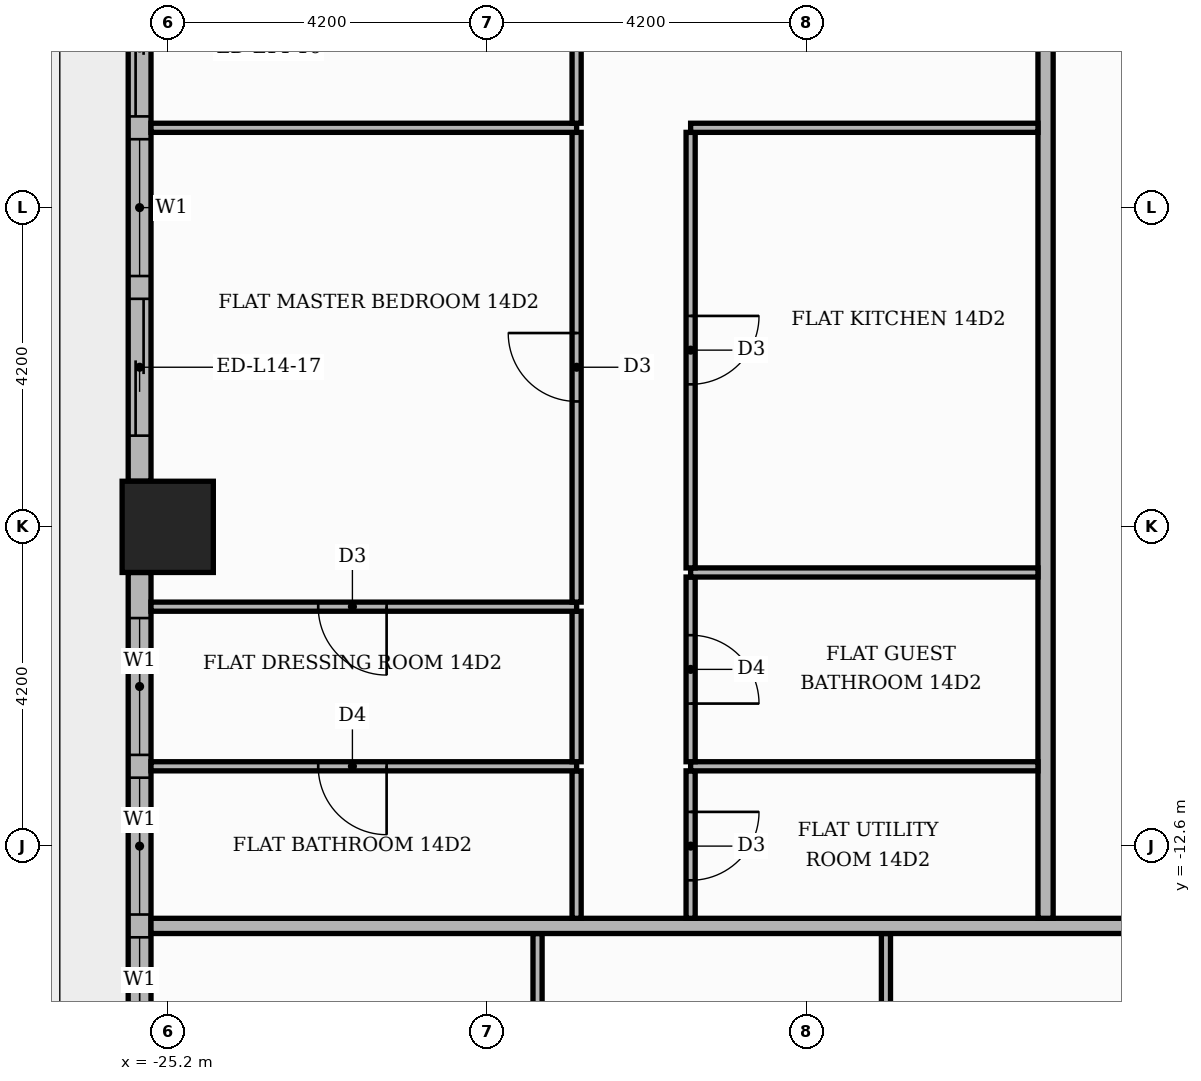
"""IFC4 building model, lengths in metres.
Left out: names, types, materials, properties, quantities, classifications, styles, units other than length and angle.
Written with IfcOpenShell. Run it as: python <this file> out.ifc"""

import sys

from ifc_helpers import new_model, si_unit, direction, frame, frame_2d, origin, origin_2d, place, context, subcontext, project, spatial, rectangle, extrude, element, fill, save


model = new_model("IFC4")
c1 = context("Model", 3, precision=1e-05, world=origin(), true_north=direction((0.0, 1.0)))
c2 = subcontext(c1, "Body", "Model", "MODEL_VIEW")
j1 = project(units=[si_unit("LENGTHUNIT", "METRE"), si_unit("PLANEANGLEUNIT", "RADIAN")], contexts=[c1])
p1 = place(None, origin())
s1 = spatial("IfcSite", under=j1, at=p1, CompositionType="ELEMENT")
p2 = place(p1, origin())
s2 = spatial("IfcBuilding", under=s1, at=p2, CompositionType="ELEMENT")
p3 = place(p2, frame((0.0, 0.0, 62.1)))
s3 = spatial("IfcBuildingStorey", under=s2, at=p3, CompositionType="ELEMENT", Elevation=62.1)
p4 = place(p3, frame((-25.2, -8.4, 0.0), z_axis=(0.0, 0.0, 1.0), x_axis=(1.0, 0.0, 0.0)))
e1 = element("IfcColumn", 1, at=p4, inside=s3, PredefinedType="COLUMN", context=c2, shape_type="SweptSolid", body=[
    extrude(rectangle(XDim=1.2, YDim=1.2, at=origin_2d()), origin(), (0.0, 0.0, 1.0), 3.9),
])
p5 = place(p3, frame((-25.57, -0.6, 0.0), z_axis=(0.0, 0.0, 1.0), x_axis=(0.0, -1.0, 0.0)))
e2 = element("IfcWall", 2, at=p5, inside=s3, PredefinedType="STANDARD", context=c2, shape_type="SweptSolid", body=[
    extrude(rectangle(XDim=7.2, YDim=0.3, at=frame_2d((3.6, 0.0))), origin(), (0.0, 0.0, 1.0), 3.48),
])
p6 = place(p5, frame((0.6, 0.0, 0.0)))
e3 = element("IfcOpeningElement", 3, at=p6, cuts=e2, PredefinedType="OPENING", context=c2, shape_type="SweptSolid", body=[
    extrude(rectangle(XDim=1.8, YDim=2.4, at=frame_2d((0.9, 1.2))), frame((0.0, 0.16, 0.0), z_axis=(0.0, -1.0, 0.0), x_axis=(1.0, 0.0, 0.0)), (0.0, 0.0, 1.0), 0.32),
])
p7 = place(p5, frame((2.7, 0.0, 0.9)))
e4 = element("IfcOpeningElement", 4, at=p7, cuts=e2, PredefinedType="OPENING", context=c2, shape_type="SweptSolid", body=[
    extrude(rectangle(XDim=1.8, YDim=2.1, at=frame_2d((0.9, 1.05))), frame((0.0, 0.16, 0.0), z_axis=(0.0, -1.0, 0.0), x_axis=(1.0, 0.0, 0.0)), (0.0, 0.0, 1.0), 0.32),
])
p8 = place(p5, frame((4.8, 0.0, 0.0)))
e5 = element("IfcOpeningElement", 5, at=p8, cuts=e2, PredefinedType="OPENING", context=c2, shape_type="SweptSolid", body=[
    extrude(rectangle(XDim=1.8, YDim=2.4, at=frame_2d((0.9, 1.2))), frame((0.0, 0.16, 0.0), z_axis=(0.0, -1.0, 0.0), x_axis=(1.0, 0.0, 0.0)), (0.0, 0.0, 1.0), 0.32),
])
p9 = place(p3, frame((-25.57, -9.0, 0.0), z_axis=(0.0, 0.0, 1.0), x_axis=(0.0, -1.0, 0.0)))
e6 = element("IfcWall", 6, at=p9, inside=s3, PredefinedType="STANDARD", context=c2, shape_type="SweptSolid", body=[
    extrude(rectangle(XDim=7.2, YDim=0.3, at=frame_2d((3.6, 0.0))), origin(), (0.0, 0.0, 1.0), 3.48),
])
p10 = place(p9, frame((0.6, 0.0, 0.9)))
e7 = element("IfcOpeningElement", 7, at=p10, cuts=e6, PredefinedType="OPENING", context=c2, shape_type="SweptSolid", body=[
    extrude(rectangle(XDim=1.8, YDim=2.1, at=frame_2d((0.9, 1.05))), frame((0.0, 0.16, 0.0), z_axis=(0.0, -1.0, 0.0), x_axis=(1.0, 0.0, 0.0)), (0.0, 0.0, 1.0), 0.32),
])
p11 = place(p9, frame((2.7, 0.0, 0.9)))
e8 = element("IfcOpeningElement", 8, at=p11, cuts=e6, PredefinedType="OPENING", context=c2, shape_type="SweptSolid", body=[
    extrude(rectangle(XDim=1.8, YDim=2.1, at=frame_2d((0.9, 1.05))), frame((0.0, 0.16, 0.0), z_axis=(0.0, -1.0, 0.0), x_axis=(1.0, 0.0, 0.0)), (0.0, 0.0, 1.0), 0.32),
])
p12 = place(p9, frame((4.8, 0.0, 0.9)))
e9 = element("IfcOpeningElement", 9, at=p12, cuts=e6, PredefinedType="OPENING", context=c2, shape_type="SweptSolid", body=[
    extrude(rectangle(XDim=1.8, YDim=2.1, at=frame_2d((0.9, 1.05))), frame((0.0, 0.16, 0.0), z_axis=(0.0, -1.0, 0.0), x_axis=(1.0, 0.0, 0.0)), (0.0, 0.0, 1.0), 0.32),
])
p13 = place(p3, frame((-20.334, -20.66, 0.0), z_axis=(0.0, 0.0, 1.0), x_axis=(0.0, 1.0, 0.0)))
e10 = element("IfcWall", 10, at=p13, inside=s3, PredefinedType="PARTITIONING", context=c2, shape_type="SweptSolid", body=[
    extrude(rectangle(XDim=6.91, YDim=0.12, at=frame_2d((3.455, 0.0))), origin(), (0.0, 0.0, 1.0), 3.48),
])
p14 = place(p13, frame((4.792, 0.0, 0.0)))
e11 = element("IfcOpeningElement", 11, at=p14, cuts=e10, PredefinedType="OPENING", context=c2, shape_type="SweptSolid", body=[
    extrude(rectangle(XDim=0.9, YDim=2.1, at=frame_2d((0.45, 1.05))), frame((0.0, 0.07, 0.0), z_axis=(0.0, -1.0, 0.0), x_axis=(1.0, 0.0, 0.0)), (0.0, 0.0, 1.0), 0.14),
])
p15 = place(p3, frame((-15.75, -20.66, 0.0), z_axis=(0.0, 0.0, 1.0), x_axis=(0.0, 1.0, 0.0)))
e12 = element("IfcWall", 12, at=p15, inside=s3, PredefinedType="PARTITIONING", context=c2, shape_type="SweptSolid", body=[
    extrude(rectangle(XDim=6.91, YDim=0.12, at=frame_2d((3.455, 0.0))), origin(), (0.0, 0.0, 1.0), 3.48),
])
p16 = place(p15, frame((2.975, 0.0, 0.0)))
e13 = element("IfcOpeningElement", 13, at=p16, cuts=e12, PredefinedType="OPENING", context=c2, shape_type="SweptSolid", body=[
    extrude(rectangle(XDim=1.0, YDim=2.1, at=frame_2d((0.5, 1.05))), frame((0.0, 0.07, 0.0), z_axis=(0.0, -1.0, 0.0), x_axis=(1.0, 0.0, 0.0)), (0.0, 0.0, 1.0), 0.14),
])
p17 = place(p3, frame((-25.42, -13.65, 0.0), z_axis=(0.0, 0.0, 1.0), x_axis=(1.0, 0.0, 0.0)))
e14 = element("IfcWall", 14, at=p17, inside=s3, PredefinedType="PARTITIONING", context=c2, shape_type="SweptSolid", body=[
    extrude(rectangle(XDim=39.07, YDim=0.2, at=frame_2d((19.535, 0.0))), origin(), (0.0, 0.0, 1.0), 3.48),
])
p18 = place(p17, frame((13.32, 0.0, 0.0)))
e15 = element("IfcOpeningElement", 15, at=p18, cuts=e14, PredefinedType="OPENING", context=c2, shape_type="SweptSolid", body=[
    extrude(rectangle(XDim=1.1, YDim=2.4, at=frame_2d((0.55, 1.2))), frame((0.0, 0.11, 0.0), z_axis=(0.0, -1.0, 0.0), x_axis=(1.0, 0.0, 0.0)), (0.0, 0.0, 1.0), 0.22),
])
p19 = place(p17, frame((21.72, 0.0, 0.0)))
e16 = element("IfcOpeningElement", 16, at=p19, cuts=e14, PredefinedType="OPENING", context=c2, shape_type="SweptSolid", body=[
    extrude(rectangle(XDim=1.1, YDim=2.4, at=frame_2d((0.55, 1.2))), frame((0.0, 0.11, 0.0), z_axis=(0.0, -1.0, 0.0), x_axis=(1.0, 0.0, 0.0)), (0.0, 0.0, 1.0), 0.22),
])
p20 = place(p3, frame((-19.82, -13.55, 0.0), z_axis=(0.0, 0.0, 1.0), x_axis=(0.0, 1.0, 0.0)))
e17 = element("IfcWall", 17, at=p20, inside=s3, PredefinedType="PARTITIONING", context=c2, shape_type="SweptSolid", body=[
    extrude(rectangle(XDim=1.94, YDim=0.12, at=frame_2d((0.97, 0.0))), origin(), (0.0, 0.0, 1.0), 3.48),
])
p21 = place(p3, frame((-18.32, -13.55, 0.0), z_axis=(0.0, 0.0, 1.0), x_axis=(0.0, 1.0, 0.0)))
e18 = element("IfcWall", 18, at=p21, inside=s3, PredefinedType="PARTITIONING", context=c2, shape_type="SweptSolid", body=[
    extrude(rectangle(XDim=1.94, YDim=0.12, at=frame_2d((0.97, 0.0))), origin(), (0.0, 0.0, 1.0), 3.48),
])
p22 = place(p21, frame((0.5, 0.0, 0.0)))
e19 = element("IfcOpeningElement", 19, at=p22, cuts=e18, PredefinedType="OPENING", context=c2, shape_type="SweptSolid", body=[
    extrude(rectangle(XDim=0.9, YDim=2.1, at=frame_2d((0.45, 1.05))), frame((0.0, 0.07, 0.0), z_axis=(0.0, -1.0, 0.0), x_axis=(1.0, 0.0, 0.0)), (0.0, 0.0, 1.0), 0.14),
])
p23 = place(p3, frame((-13.65, -13.55, 0.0), z_axis=(0.0, 0.0, 1.0), x_axis=(0.0, 1.0, 0.0)))
e20 = element("IfcWall", 20, at=p23, inside=s3, PredefinedType="PARTITIONING", context=c2, shape_type="SweptSolid", body=[
    extrude(rectangle(XDim=18.7, YDim=0.2, at=frame_2d((9.35, 0.0))), origin(), (0.0, 0.0, 1.0), 3.48),
])
p24 = place(p23, frame((11.95, 0.0, 0.0)))
e21 = element("IfcOpeningElement", 21, at=p24, cuts=e20, PredefinedType="OPENING", context=c2, shape_type="SweptSolid", body=[
    extrude(rectangle(XDim=1.1, YDim=2.4, at=frame_2d((0.55, 1.2))), frame((0.0, 0.11, 0.0), z_axis=(0.0, -1.0, 0.0), x_axis=(1.0, 0.0, 0.0)), (0.0, 0.0, 1.0), 0.22),
])
p25 = place(p3, frame((-25.42, -11.55, 0.0), z_axis=(0.0, 0.0, 1.0), x_axis=(1.0, 0.0, 0.0)))
e22 = element("IfcWall", 22, at=p25, inside=s3, PredefinedType="PARTITIONING", context=c2, shape_type="SweptSolid", body=[
    extrude(rectangle(XDim=5.6, YDim=0.12, at=frame_2d((2.8, 0.0))), origin(), (0.0, 0.0, 1.0), 3.48),
])
p26 = place(p25, frame((2.2, 0.0, 0.0)))
e23 = element("IfcOpeningElement", 23, at=p26, cuts=e22, PredefinedType="OPENING", context=c2, shape_type="SweptSolid", body=[
    extrude(rectangle(XDim=0.9, YDim=2.1, at=frame_2d((0.45, 1.05))), frame((0.0, 0.07, 0.0), z_axis=(0.0, -1.0, 0.0), x_axis=(1.0, 0.0, 0.0)), (0.0, 0.0, 1.0), 0.14),
])
p27 = place(p3, frame((-18.32, -11.55, 0.0), z_axis=(0.0, 0.0, 1.0), x_axis=(1.0, 0.0, 0.0)))
e24 = element("IfcWall", 24, at=p27, inside=s3, PredefinedType="PARTITIONING", context=c2, shape_type="SweptSolid", body=[
    extrude(rectangle(XDim=4.57, YDim=0.12, at=frame_2d((2.285, 0.0))), origin(), (0.0, 0.0, 1.0), 3.48),
])
p28 = place(p3, frame((-19.82, -11.49, 0.0), z_axis=(0.0, 0.0, 1.0), x_axis=(0.0, 1.0, 0.0)))
e25 = element("IfcWall", 25, at=p28, inside=s3, PredefinedType="PARTITIONING", context=c2, shape_type="SweptSolid", body=[
    extrude(rectangle(XDim=1.98, YDim=0.12, at=frame_2d((0.99, 0.0))), origin(), (0.0, 0.0, 1.0), 3.48),
])
p29 = place(p3, frame((-18.32, -11.49, 0.0), z_axis=(0.0, 0.0, 1.0), x_axis=(0.0, 1.0, 0.0)))
e26 = element("IfcWall", 26, at=p29, inside=s3, PredefinedType="PARTITIONING", context=c2, shape_type="SweptSolid", body=[
    extrude(rectangle(XDim=2.43, YDim=0.12, at=frame_2d((1.215, 0.0))), origin(), (0.0, 0.0, 1.0), 3.48),
])
p30 = place(p29, frame((0.765, 0.0, 0.0)))
e27 = element("IfcOpeningElement", 27, at=p30, cuts=e26, PredefinedType="OPENING", context=c2, shape_type="SweptSolid", body=[
    extrude(rectangle(XDim=0.9, YDim=2.1, at=frame_2d((0.45, 1.05))), frame((0.0, 0.07, 0.0), z_axis=(0.0, -1.0, 0.0), x_axis=(1.0, 0.0, 0.0)), (0.0, 0.0, 1.0), 0.14),
])
p31 = place(p3, frame((-25.42, -9.45, 0.0), z_axis=(0.0, 0.0, 1.0), x_axis=(1.0, 0.0, 0.0)))
e28 = element("IfcWall", 28, at=p31, inside=s3, PredefinedType="PARTITIONING", context=c2, shape_type="SweptSolid", body=[
    extrude(rectangle(XDim=5.6, YDim=0.12, at=frame_2d((2.8, 0.0))), origin(), (0.0, 0.0, 1.0), 3.48),
])
p32 = place(p31, frame((2.2, 0.0, 0.0)))
e29 = element("IfcOpeningElement", 29, at=p32, cuts=e28, PredefinedType="OPENING", context=c2, shape_type="SweptSolid", body=[
    extrude(rectangle(XDim=0.9, YDim=2.1, at=frame_2d((0.45, 1.05))), frame((0.0, 0.07, 0.0), z_axis=(0.0, -1.0, 0.0), x_axis=(1.0, 0.0, 0.0)), (0.0, 0.0, 1.0), 0.14),
])
p33 = place(p3, frame((-19.82, -9.39, 0.0), z_axis=(0.0, 0.0, 1.0), x_axis=(0.0, 1.0, 0.0)))
e30 = element("IfcWall", 30, at=p33, inside=s3, PredefinedType="PARTITIONING", context=c2, shape_type="SweptSolid", body=[
    extrude(rectangle(XDim=6.18, YDim=0.12, at=frame_2d((3.09, 0.0))), origin(), (0.0, 0.0, 1.0), 3.48),
])
p34 = place(p33, frame((2.64, 0.0, 0.0)))
e31 = element("IfcOpeningElement", 31, at=p34, cuts=e30, PredefinedType="OPENING", context=c2, shape_type="SweptSolid", body=[
    extrude(rectangle(XDim=0.9, YDim=2.1, at=frame_2d((0.45, 1.05))), frame((0.0, 0.07, 0.0), z_axis=(0.0, -1.0, 0.0), x_axis=(1.0, 0.0, 0.0)), (0.0, 0.0, 1.0), 0.14),
])
p35 = place(p3, frame((-18.32, -9.0, 0.0), z_axis=(0.0, 0.0, 1.0), x_axis=(1.0, 0.0, 0.0)))
e32 = element("IfcWall", 32, at=p35, inside=s3, PredefinedType="PARTITIONING", context=c2, shape_type="SweptSolid", body=[
    extrude(rectangle(XDim=4.57, YDim=0.12, at=frame_2d((2.285, 0.0))), origin(), (0.0, 0.0, 1.0), 3.48),
])
p36 = place(p3, frame((-18.32, -8.94, 0.0), z_axis=(0.0, 0.0, 1.0), x_axis=(0.0, 1.0, 0.0)))
e33 = element("IfcWall", 33, at=p36, inside=s3, PredefinedType="PARTITIONING", context=c2, shape_type="SweptSolid", body=[
    extrude(rectangle(XDim=5.73, YDim=0.12, at=frame_2d((2.865, 0.0))), origin(), (0.0, 0.0, 1.0), 3.48),
])
p37 = place(p36, frame((2.415, 0.0, 0.0)))
e34 = element("IfcOpeningElement", 34, at=p37, cuts=e33, PredefinedType="OPENING", context=c2, shape_type="SweptSolid", body=[
    extrude(rectangle(XDim=0.9, YDim=2.1, at=frame_2d((0.45, 1.05))), frame((0.0, 0.07, 0.0), z_axis=(0.0, -1.0, 0.0), x_axis=(1.0, 0.0, 0.0)), (0.0, 0.0, 1.0), 0.14),
])
p38 = place(p3, frame((-25.42, -3.15, 0.0), z_axis=(0.0, 0.0, 1.0), x_axis=(1.0, 0.0, 0.0)))
e35 = element("IfcWall", 35, at=p38, inside=s3, PredefinedType="PARTITIONING", context=c2, shape_type="SweptSolid", body=[
    extrude(rectangle(XDim=5.6, YDim=0.12, at=frame_2d((2.8, 0.0))), origin(), (0.0, 0.0, 1.0), 3.48),
])
p39 = place(p3, frame((-18.32, -3.15, 0.0), z_axis=(0.0, 0.0, 1.0), x_axis=(1.0, 0.0, 0.0)))
e36 = element("IfcWall", 36, at=p39, inside=s3, PredefinedType="PARTITIONING", context=c2, shape_type="SweptSolid", body=[
    extrude(rectangle(XDim=4.57, YDim=0.12, at=frame_2d((2.285, 0.0))), origin(), (0.0, 0.0, 1.0), 3.48),
])
p40 = place(p3, frame((-19.82, -3.09, 0.0), z_axis=(0.0, 0.0, 1.0), x_axis=(0.0, 1.0, 0.0)))
e37 = element("IfcWall", 37, at=p40, inside=s3, PredefinedType="PARTITIONING", context=c2, shape_type="SweptSolid", body=[
    extrude(rectangle(XDim=8.24, YDim=0.12, at=frame_2d((4.12, 0.0))), origin(), (0.0, 0.0, 1.0), 3.48),
])
p41 = place(p40, frame((3.64, 0.0, 0.0)))
e38 = element("IfcOpeningElement", 38, at=p41, cuts=e37, PredefinedType="OPENING", context=c2, shape_type="SweptSolid", body=[
    extrude(rectangle(XDim=1.0, YDim=2.1, at=frame_2d((0.5, 1.05))), frame((0.0, 0.07, 0.0), z_axis=(0.0, -1.0, 0.0), x_axis=(1.0, 0.0, 0.0)), (0.0, 0.0, 1.0), 0.14),
])
p42 = place(p6, origin())
e39 = element("IfcDoor", 39, at=p42, inside=s3, OperationType="SLIDING_TO_LEFT", PredefinedType="DOOR", context=c2, shape_type="SweptSolid", body=[
    extrude(rectangle(XDim=1.8, YDim=2.4, at=frame_2d((0.9, 1.2))), frame((0.0, 0.025, 0.0), z_axis=(0.0, -1.0, 0.0), x_axis=(1.0, 0.0, 0.0)), (0.0, 0.0, 1.0), 0.05),
])
fill(e3, e39)
p43 = place(p7, origin())
e40 = element("IfcWindow", 40, at=p43, inside=s3, PartitioningType="SINGLE_PANEL", PredefinedType="WINDOW", context=c2, shape_type="SweptSolid", body=[
    extrude(rectangle(XDim=1.8, YDim=2.1, at=frame_2d((0.9, 1.05))), frame((0.0, 0.03, 0.0), z_axis=(0.0, -1.0, 0.0), x_axis=(1.0, 0.0, 0.0)), (0.0, 0.0, 1.0), 0.06),
])
fill(e4, e40)
p44 = place(p8, origin())
e41 = element("IfcDoor", 41, at=p44, inside=s3, OperationType="SLIDING_TO_RIGHT", PredefinedType="DOOR", context=c2, shape_type="SweptSolid", body=[
    extrude(rectangle(XDim=1.8, YDim=2.4, at=frame_2d((0.9, 1.2))), frame((0.0, 0.025, 0.0), z_axis=(0.0, -1.0, 0.0), x_axis=(1.0, 0.0, 0.0)), (0.0, 0.0, 1.0), 0.05),
])
fill(e5, e41)
p45 = place(p10, origin())
e42 = element("IfcWindow", 42, at=p45, inside=s3, PartitioningType="SINGLE_PANEL", PredefinedType="WINDOW", context=c2, shape_type="SweptSolid", body=[
    extrude(rectangle(XDim=1.8, YDim=2.1, at=frame_2d((0.9, 1.05))), frame((0.0, 0.03, 0.0), z_axis=(0.0, -1.0, 0.0), x_axis=(1.0, 0.0, 0.0)), (0.0, 0.0, 1.0), 0.06),
])
fill(e7, e42)
p46 = place(p11, origin())
e43 = element("IfcWindow", 43, at=p46, inside=s3, PartitioningType="SINGLE_PANEL", PredefinedType="WINDOW", context=c2, shape_type="SweptSolid", body=[
    extrude(rectangle(XDim=1.8, YDim=2.1, at=frame_2d((0.9, 1.05))), frame((0.0, 0.03, 0.0), z_axis=(0.0, -1.0, 0.0), x_axis=(1.0, 0.0, 0.0)), (0.0, 0.0, 1.0), 0.06),
])
fill(e8, e43)
p47 = place(p12, origin())
e44 = element("IfcWindow", 44, at=p47, inside=s3, PartitioningType="SINGLE_PANEL", PredefinedType="WINDOW", context=c2, shape_type="SweptSolid", body=[
    extrude(rectangle(XDim=1.8, YDim=2.1, at=frame_2d((0.9, 1.05))), frame((0.0, 0.03, 0.0), z_axis=(0.0, -1.0, 0.0), x_axis=(1.0, 0.0, 0.0)), (0.0, 0.0, 1.0), 0.06),
])
fill(e9, e44)
p48 = place(p37, frame((0.9, 0.0, 0.0), z_axis=(0.0, 0.0, 1.0), x_axis=(-1.0, 0.0, 0.0)))
e45 = element("IfcDoor", 45, at=p48, inside=s3, OperationType="SINGLE_SWING_RIGHT", PredefinedType="DOOR", context=c2, shape_type="SweptSolid", body=[
    extrude(rectangle(XDim=0.9, YDim=2.1, at=frame_2d((0.45, 1.05))), frame((0.0, 0.025, 0.0), z_axis=(0.0, -1.0, 0.0), x_axis=(1.0, 0.0, 0.0)), (0.0, 0.0, 1.0), 0.05),
])
fill(e34, e45)
p49 = place(p30, frame((0.9, 0.0, 0.0), z_axis=(0.0, 0.0, 1.0), x_axis=(-1.0, 0.0, 0.0)))
e46 = element("IfcDoor", 46, at=p49, inside=s3, OperationType="SINGLE_SWING_LEFT", PredefinedType="DOOR", context=c2, shape_type="SweptSolid", body=[
    extrude(rectangle(XDim=0.9, YDim=2.1, at=frame_2d((0.45, 1.05))), frame((0.0, 0.025, 0.0), z_axis=(0.0, -1.0, 0.0), x_axis=(1.0, 0.0, 0.0)), (0.0, 0.0, 1.0), 0.05),
])
fill(e27, e46)
p50 = place(p22, frame((0.9, 0.0, 0.0), z_axis=(0.0, 0.0, 1.0), x_axis=(-1.0, 0.0, 0.0)))
e47 = element("IfcDoor", 47, at=p50, inside=s3, OperationType="SINGLE_SWING_RIGHT", PredefinedType="DOOR", context=c2, shape_type="SweptSolid", body=[
    extrude(rectangle(XDim=0.9, YDim=2.1, at=frame_2d((0.45, 1.05))), frame((0.0, 0.025, 0.0), z_axis=(0.0, -1.0, 0.0), x_axis=(1.0, 0.0, 0.0)), (0.0, 0.0, 1.0), 0.05),
])
fill(e19, e47)
p51 = place(p34, origin())
e48 = element("IfcDoor", 48, at=p51, inside=s3, OperationType="SINGLE_SWING_RIGHT", PredefinedType="DOOR", context=c2, shape_type="SweptSolid", body=[
    extrude(rectangle(XDim=0.9, YDim=2.1, at=frame_2d((0.45, 1.05))), frame((0.0, 0.025, 0.0), z_axis=(0.0, -1.0, 0.0), x_axis=(1.0, 0.0, 0.0)), (0.0, 0.0, 1.0), 0.05),
])
fill(e31, e48)
p52 = place(p32, frame((0.9, 0.0, 0.0), z_axis=(0.0, 0.0, 1.0), x_axis=(-1.0, 0.0, 0.0)))
e49 = element("IfcDoor", 49, at=p52, inside=s3, OperationType="SINGLE_SWING_RIGHT", PredefinedType="DOOR", context=c2, shape_type="SweptSolid", body=[
    extrude(rectangle(XDim=0.9, YDim=2.1, at=frame_2d((0.45, 1.05))), frame((0.0, 0.025, 0.0), z_axis=(0.0, -1.0, 0.0), x_axis=(1.0, 0.0, 0.0)), (0.0, 0.0, 1.0), 0.05),
])
fill(e29, e49)
p53 = place(p26, frame((0.9, 0.0, 0.0), z_axis=(0.0, 0.0, 1.0), x_axis=(-1.0, 0.0, 0.0)))
e50 = element("IfcDoor", 50, at=p53, inside=s3, OperationType="SINGLE_SWING_RIGHT", PredefinedType="DOOR", context=c2, shape_type="SweptSolid", body=[
    extrude(rectangle(XDim=0.9, YDim=2.1, at=frame_2d((0.45, 1.05))), frame((0.0, 0.025, 0.0), z_axis=(0.0, -1.0, 0.0), x_axis=(1.0, 0.0, 0.0)), (0.0, 0.0, 1.0), 0.05),
])
fill(e23, e50)
save(model, sys.argv[1])
